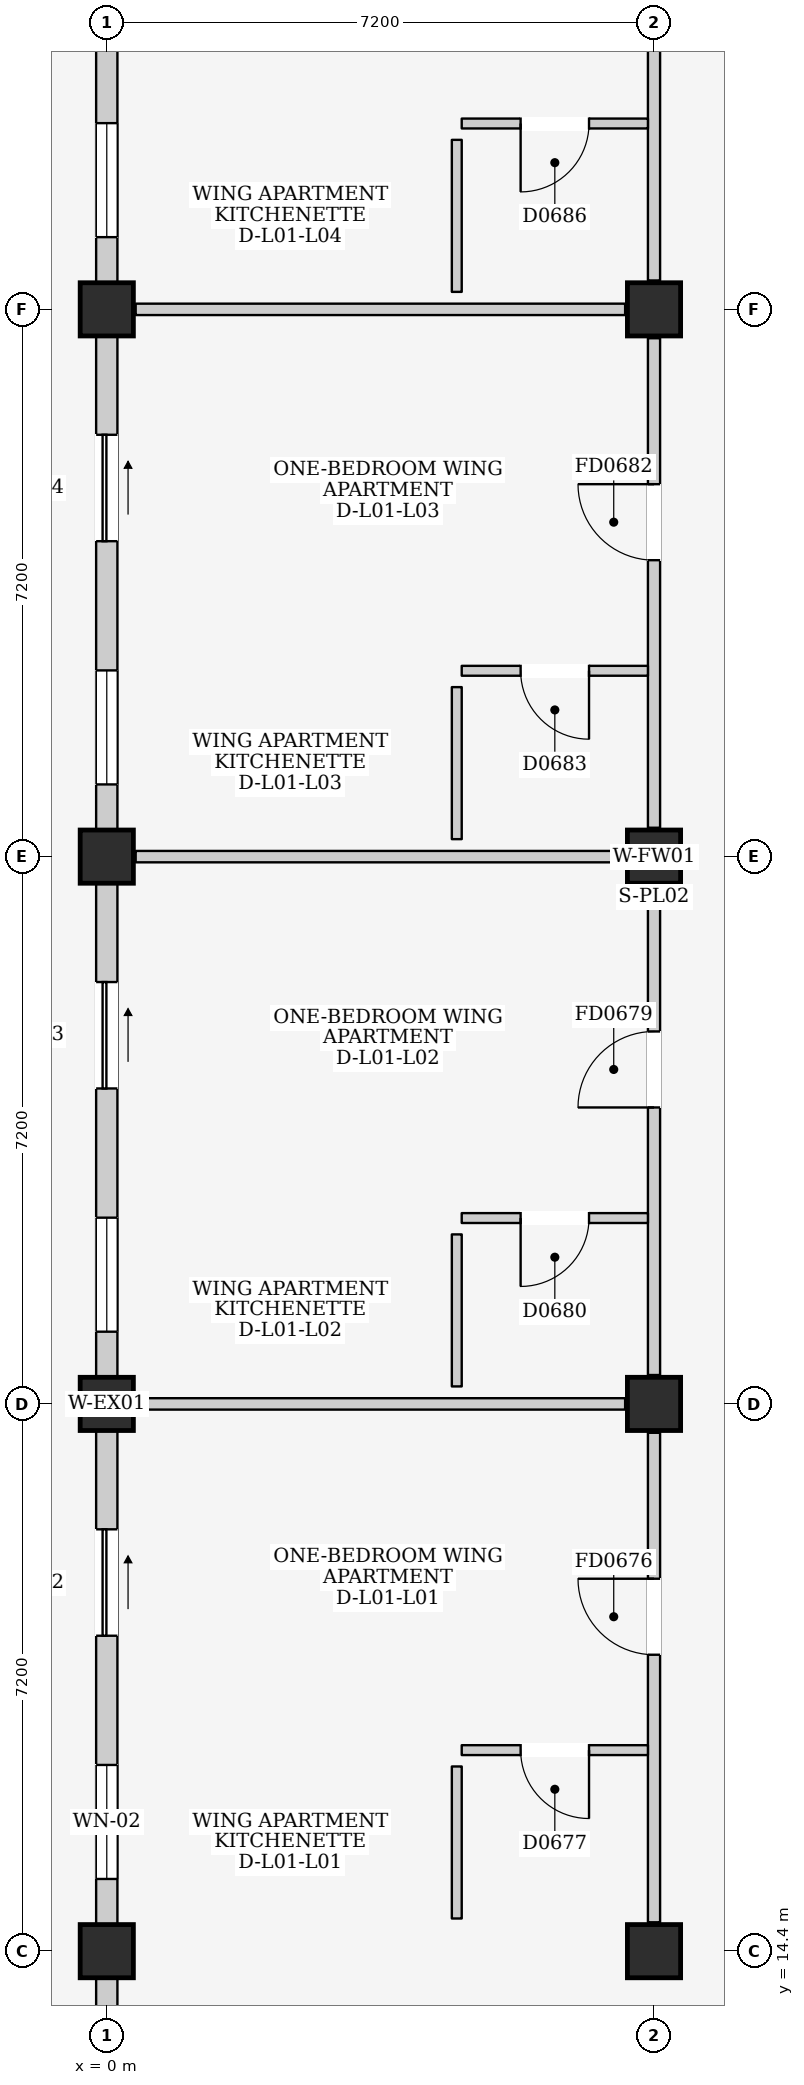
"""IFC4 building model, lengths in metres.
Left out: names, types, materials, properties, quantities, classifications, styles, units other than length and angle.
Written with IfcOpenShell. Run it as: python <this file> out.ifc"""

import sys

from ifc_helpers import new_model, si_unit, direction, frame, frame_2d, origin, origin_2d, place, context, subcontext, project, spatial, rectangle, extrude, element, fill, save


model = new_model("IFC4")
c1 = context("Model", 3, precision=1e-05, world=origin(), true_north=direction((0.0, 1.0)))
c2 = subcontext(c1, "Body", "Model", "MODEL_VIEW")
j1 = project(units=[si_unit("LENGTHUNIT", "METRE"), si_unit("PLANEANGLEUNIT", "RADIAN")], contexts=[c1])
p1 = place(None, origin())
s1 = spatial("IfcSite", under=j1, at=p1, CompositionType="ELEMENT")
p2 = place(p1, origin())
s2 = spatial("IfcBuilding", under=s1, at=p2, CompositionType="ELEMENT")
p3 = place(p2, frame((0.0, 0.0, 4.5)))
s3 = spatial("IfcBuildingStorey", under=s2, at=p3, CompositionType="ELEMENT", Elevation=4.5)
for number, where, z_axis, x_axis in (
    (1, (0.0, 14.4, 0.0), (0.0, 0.0, 1.0), (1.0, 0.0, 0.0)),
    (2, (0.0, 21.6, 0.0), (0.0, 0.0, 1.0), (1.0, 0.0, 0.0)),
    (3, (0.0, 28.8, 0.0), (0.0, 0.0, 1.0), (1.0, 0.0, 0.0)),
    (4, (0.0, 36.0, 0.0), (0.0, 0.0, 1.0), (1.0, 0.0, 0.0)),
    (5, (7.2, 14.4, 0.0), (0.0, 0.0, 1.0), (1.0, 0.0, 0.0)),
    (6, (7.2, 21.6, 0.0), (0.0, 0.0, 1.0), (1.0, 0.0, 0.0)),
    (7, (7.2, 28.8, 0.0), (0.0, 0.0, 1.0), (1.0, 0.0, 0.0)),
    (8, (7.2, 36.0, 0.0), (0.0, 0.0, 1.0), (1.0, 0.0, 0.0)),
):
    element("IfcColumn", number, at=place(p3, frame(where, z_axis=z_axis, x_axis=x_axis)), inside=s3, PredefinedType="COLUMN", context=c2, shape_type="SweptSolid", body=[
        extrude(rectangle(XDim=0.7, YDim=0.7, at=origin_2d()), origin(), (0.0, 0.0, 1.0), 4.5),
    ])
p4 = place(p3, frame((0.0, 7.55, 0.0), z_axis=(0.0, 0.0, 1.0), x_axis=(0.0, 1.0, 0.0)))
e9 = element("IfcWall", 9, at=p4, inside=s3, PredefinedType="ELEMENTEDWALL", context=c2, shape_type="SweptSolid", body=[
    extrude(rectangle(XDim=6.5, YDim=0.28, at=frame_2d((3.25, 0.0))), origin(), (0.0, 0.0, 1.0), 3.715),
])
p5 = place(p4, frame((3.65, 0.0, 0.0)))
e10 = element("IfcOpeningElement", 10, at=p5, cuts=e9, PredefinedType="OPENING", context=c2, shape_type="SweptSolid", body=[
    extrude(rectangle(XDim=1.4, YDim=2.1, at=frame_2d((0.7, 1.05))), frame((0.0, 0.155, 0.0), z_axis=(0.0, -1.0, 0.0), x_axis=(1.0, 0.0, 0.0)), (0.0, 0.0, 1.0), 0.31),
])
p6 = place(p3, frame((0.0, 14.75, 0.0), z_axis=(0.0, 0.0, 1.0), x_axis=(0.0, 1.0, 0.0)))
e11 = element("IfcWall", 11, at=p6, inside=s3, PredefinedType="ELEMENTEDWALL", context=c2, shape_type="SweptSolid", body=[
    extrude(rectangle(XDim=6.5, YDim=0.28, at=frame_2d((3.25, 0.0))), origin(), (0.0, 0.0, 1.0), 3.715),
])
p7 = place(p6, frame((3.8, 0.0, 0.0)))
e12 = element("IfcOpeningElement", 12, at=p7, cuts=e11, PredefinedType="OPENING", context=c2, shape_type="SweptSolid", body=[
    extrude(rectangle(XDim=1.4, YDim=2.1, at=frame_2d((0.7, 1.05))), frame((0.0, 0.155, 0.0), z_axis=(0.0, -1.0, 0.0), x_axis=(1.0, 0.0, 0.0)), (0.0, 0.0, 1.0), 0.31),
])
p8 = place(p6, frame((0.6, 0.0, 0.95)))
e13 = element("IfcOpeningElement", 13, at=p8, cuts=e11, PredefinedType="OPENING", context=c2, shape_type="SweptSolid", body=[
    extrude(rectangle(XDim=1.5, YDim=1.5, at=frame_2d((0.75, 0.75))), frame((0.0, 0.155, 0.0), z_axis=(0.0, -1.0, 0.0), x_axis=(1.0, 0.0, 0.0)), (0.0, 0.0, 1.0), 0.31),
])
p9 = place(p3, frame((0.0, 21.95, 0.0), z_axis=(0.0, 0.0, 1.0), x_axis=(0.0, 1.0, 0.0)))
e14 = element("IfcWall", 14, at=p9, inside=s3, PredefinedType="ELEMENTEDWALL", context=c2, shape_type="SweptSolid", body=[
    extrude(rectangle(XDim=6.5, YDim=0.28, at=frame_2d((3.25, 0.0))), origin(), (0.0, 0.0, 1.0), 3.715),
])
p10 = place(p9, frame((3.8, 0.0, 0.0)))
e15 = element("IfcOpeningElement", 15, at=p10, cuts=e14, PredefinedType="OPENING", context=c2, shape_type="SweptSolid", body=[
    extrude(rectangle(XDim=1.4, YDim=2.1, at=frame_2d((0.7, 1.05))), frame((0.0, 0.155, 0.0), z_axis=(0.0, -1.0, 0.0), x_axis=(1.0, 0.0, 0.0)), (0.0, 0.0, 1.0), 0.31),
])
p11 = place(p9, frame((0.6, 0.0, 0.95)))
e16 = element("IfcOpeningElement", 16, at=p11, cuts=e14, PredefinedType="OPENING", context=c2, shape_type="SweptSolid", body=[
    extrude(rectangle(XDim=1.5, YDim=1.5, at=frame_2d((0.75, 0.75))), frame((0.0, 0.155, 0.0), z_axis=(0.0, -1.0, 0.0), x_axis=(1.0, 0.0, 0.0)), (0.0, 0.0, 1.0), 0.31),
])
p12 = place(p3, frame((0.0, 29.15, 0.0), z_axis=(0.0, 0.0, 1.0), x_axis=(0.0, 1.0, 0.0)))
e17 = element("IfcWall", 17, at=p12, inside=s3, PredefinedType="ELEMENTEDWALL", context=c2, shape_type="SweptSolid", body=[
    extrude(rectangle(XDim=6.5, YDim=0.28, at=frame_2d((3.25, 0.0))), origin(), (0.0, 0.0, 1.0), 3.715),
])
p13 = place(p12, frame((3.8, 0.0, 0.0)))
e18 = element("IfcOpeningElement", 18, at=p13, cuts=e17, PredefinedType="OPENING", context=c2, shape_type="SweptSolid", body=[
    extrude(rectangle(XDim=1.4, YDim=2.1, at=frame_2d((0.7, 1.05))), frame((0.0, 0.155, 0.0), z_axis=(0.0, -1.0, 0.0), x_axis=(1.0, 0.0, 0.0)), (0.0, 0.0, 1.0), 0.31),
])
p14 = place(p12, frame((0.6, 0.0, 0.95)))
e19 = element("IfcOpeningElement", 19, at=p14, cuts=e17, PredefinedType="OPENING", context=c2, shape_type="SweptSolid", body=[
    extrude(rectangle(XDim=1.5, YDim=1.5, at=frame_2d((0.75, 0.75))), frame((0.0, 0.155, 0.0), z_axis=(0.0, -1.0, 0.0), x_axis=(1.0, 0.0, 0.0)), (0.0, 0.0, 1.0), 0.31),
])
p15 = place(p3, frame((0.0, 36.35, 0.0), z_axis=(0.0, 0.0, 1.0), x_axis=(0.0, 1.0, 0.0)))
e20 = element("IfcWall", 20, at=p15, inside=s3, PredefinedType="ELEMENTEDWALL", context=c2, shape_type="SweptSolid", body=[
    extrude(rectangle(XDim=6.5, YDim=0.28, at=frame_2d((3.25, 0.0))), origin(), (0.0, 0.0, 1.0), 3.715),
])
p16 = place(p15, frame((3.8, 0.0, 0.0)))
e21 = element("IfcOpeningElement", 21, at=p16, cuts=e20, PredefinedType="OPENING", context=c2, shape_type="SweptSolid", body=[
    extrude(rectangle(XDim=1.4, YDim=2.1, at=frame_2d((0.7, 1.05))), frame((0.0, 0.155, 0.0), z_axis=(0.0, -1.0, 0.0), x_axis=(1.0, 0.0, 0.0)), (0.0, 0.0, 1.0), 0.31),
])
p17 = place(p15, frame((0.6, 0.0, 0.95)))
e22 = element("IfcOpeningElement", 22, at=p17, cuts=e20, PredefinedType="OPENING", context=c2, shape_type="SweptSolid", body=[
    extrude(rectangle(XDim=1.5, YDim=1.5, at=frame_2d((0.75, 0.75))), frame((0.0, 0.155, 0.0), z_axis=(0.0, -1.0, 0.0), x_axis=(1.0, 0.0, 0.0)), (0.0, 0.0, 1.0), 0.31),
])
p18 = place(p3, frame((7.2, 14.78, 0.0), z_axis=(0.0, 0.0, 1.0), x_axis=(0.0, 1.0, 0.0)))
e23 = element("IfcWall", 23, at=p18, inside=s3, PredefinedType="PARTITIONING", context=c2, shape_type="SweptSolid", body=[
    extrude(rectangle(XDim=6.44, YDim=0.16, at=frame_2d((3.22, 0.0))), origin(), (0.0, 0.0, 1.0), 3.685),
])
p19 = place(p18, frame((3.52, 0.0, 0.0)))
e24 = element("IfcOpeningElement", 24, at=p19, cuts=e23, PredefinedType="OPENING", context=c2, shape_type="SweptSolid", body=[
    extrude(rectangle(XDim=1.0, YDim=2.15, at=frame_2d((0.5, 1.075))), frame((0.0, 0.095, 0.0), z_axis=(0.0, -1.0, 0.0), x_axis=(1.0, 0.0, 0.0)), (0.0, 0.0, 1.0), 0.19),
])
p20 = place(p3, frame((0.38, 21.6, 0.0), z_axis=(0.0, 0.0, 1.0), x_axis=(1.0, 0.0, 0.0)))
e25 = element("IfcWall", 25, at=p20, inside=s3, PredefinedType="PARTITIONING", context=c2, shape_type="SweptSolid", body=[
    extrude(rectangle(XDim=6.44, YDim=0.15, at=frame_2d((3.22, 0.0))), origin(), (0.0, 0.0, 1.0), 3.635),
])
p21 = place(p3, frame((4.67, 17.045, 0.0), z_axis=(0.0, 0.0, 1.0), x_axis=(1.0, 0.0, 0.0)))
e26 = element("IfcWall", 26, at=p21, inside=s3, PredefinedType="PARTITIONING", context=c2, shape_type="SweptSolid", body=[
    extrude(rectangle(XDim=2.45, YDim=0.13, at=frame_2d((1.225, 0.0))), origin(), (0.0, 0.0, 1.0), 4.25),
])
p22 = place(p21, frame((0.775, 0.0, 0.0)))
e27 = element("IfcOpeningElement", 27, at=p22, cuts=e26, PredefinedType="OPENING", context=c2, shape_type="SweptSolid", body=[
    extrude(rectangle(XDim=0.9, YDim=2.1, at=frame_2d((0.45, 1.05))), frame((0.0, 0.08, 0.0), z_axis=(0.0, -1.0, 0.0), x_axis=(1.0, 0.0, 0.0)), (0.0, 0.0, 1.0), 0.16),
])
p23 = place(p3, frame((4.605, 14.83, 0.0), z_axis=(0.0, 0.0, 1.0), x_axis=(0.0, 1.0, 0.0)))
e28 = element("IfcWall", 28, at=p23, inside=s3, PredefinedType="PARTITIONING", context=c2, shape_type="SweptSolid", body=[
    extrude(rectangle(XDim=2.0, YDim=0.13, at=frame_2d((1.0, 0.0))), origin(), (0.0, 0.0, 1.0), 4.25),
])
p24 = place(p3, frame((7.2, 21.98, 0.0), z_axis=(0.0, 0.0, 1.0), x_axis=(0.0, 1.0, 0.0)))
e29 = element("IfcWall", 29, at=p24, inside=s3, PredefinedType="PARTITIONING", context=c2, shape_type="SweptSolid", body=[
    extrude(rectangle(XDim=6.44, YDim=0.16, at=frame_2d((3.22, 0.0))), origin(), (0.0, 0.0, 1.0), 3.685),
])
p25 = place(p24, frame((3.52, 0.0, 0.0)))
e30 = element("IfcOpeningElement", 30, at=p25, cuts=e29, PredefinedType="OPENING", context=c2, shape_type="SweptSolid", body=[
    extrude(rectangle(XDim=1.0, YDim=2.15, at=frame_2d((0.5, 1.075))), frame((0.0, 0.095, 0.0), z_axis=(0.0, -1.0, 0.0), x_axis=(1.0, 0.0, 0.0)), (0.0, 0.0, 1.0), 0.19),
])
p26 = place(p3, frame((0.38, 28.8, 0.0), z_axis=(0.0, 0.0, 1.0), x_axis=(1.0, 0.0, 0.0)))
e31 = element("IfcWall", 31, at=p26, inside=s3, PredefinedType="PARTITIONING", context=c2, shape_type="SweptSolid", body=[
    extrude(rectangle(XDim=6.44, YDim=0.15, at=frame_2d((3.22, 0.0))), origin(), (0.0, 0.0, 1.0), 3.635),
])
p27 = place(p3, frame((4.67, 24.045, 0.0), z_axis=(0.0, 0.0, 1.0), x_axis=(1.0, 0.0, 0.0)))
e32 = element("IfcWall", 32, at=p27, inside=s3, PredefinedType="PARTITIONING", context=c2, shape_type="SweptSolid", body=[
    extrude(rectangle(XDim=2.45, YDim=0.13, at=frame_2d((1.225, 0.0))), origin(), (0.0, 0.0, 1.0), 4.25),
])
p28 = place(p27, frame((0.775, 0.0, 0.0)))
e33 = element("IfcOpeningElement", 33, at=p28, cuts=e32, PredefinedType="OPENING", context=c2, shape_type="SweptSolid", body=[
    extrude(rectangle(XDim=0.9, YDim=2.1, at=frame_2d((0.45, 1.05))), frame((0.0, 0.08, 0.0), z_axis=(0.0, -1.0, 0.0), x_axis=(1.0, 0.0, 0.0)), (0.0, 0.0, 1.0), 0.16),
])
p29 = place(p3, frame((4.605, 21.83, 0.0), z_axis=(0.0, 0.0, 1.0), x_axis=(0.0, 1.0, 0.0)))
e34 = element("IfcWall", 34, at=p29, inside=s3, PredefinedType="PARTITIONING", context=c2, shape_type="SweptSolid", body=[
    extrude(rectangle(XDim=2.0, YDim=0.13, at=frame_2d((1.0, 0.0))), origin(), (0.0, 0.0, 1.0), 4.25),
])
p30 = place(p3, frame((7.2, 29.18, 0.0), z_axis=(0.0, 0.0, 1.0), x_axis=(0.0, 1.0, 0.0)))
e35 = element("IfcWall", 35, at=p30, inside=s3, PredefinedType="PARTITIONING", context=c2, shape_type="SweptSolid", body=[
    extrude(rectangle(XDim=6.44, YDim=0.16, at=frame_2d((3.22, 0.0))), origin(), (0.0, 0.0, 1.0), 3.685),
])
p31 = place(p30, frame((3.52, 0.0, 0.0)))
e36 = element("IfcOpeningElement", 36, at=p31, cuts=e35, PredefinedType="OPENING", context=c2, shape_type="SweptSolid", body=[
    extrude(rectangle(XDim=1.0, YDim=2.15, at=frame_2d((0.5, 1.075))), frame((0.0, 0.095, 0.0), z_axis=(0.0, -1.0, 0.0), x_axis=(1.0, 0.0, 0.0)), (0.0, 0.0, 1.0), 0.19),
])
p32 = place(p3, frame((0.38, 36.0, 0.0), z_axis=(0.0, 0.0, 1.0), x_axis=(1.0, 0.0, 0.0)))
e37 = element("IfcWall", 37, at=p32, inside=s3, PredefinedType="PARTITIONING", context=c2, shape_type="SweptSolid", body=[
    extrude(rectangle(XDim=6.44, YDim=0.15, at=frame_2d((3.22, 0.0))), origin(), (0.0, 0.0, 1.0), 3.635),
])
p33 = place(p3, frame((4.67, 31.245, 0.0), z_axis=(0.0, 0.0, 1.0), x_axis=(1.0, 0.0, 0.0)))
e38 = element("IfcWall", 38, at=p33, inside=s3, PredefinedType="PARTITIONING", context=c2, shape_type="SweptSolid", body=[
    extrude(rectangle(XDim=2.45, YDim=0.13, at=frame_2d((1.225, 0.0))), origin(), (0.0, 0.0, 1.0), 4.25),
])
p34 = place(p33, frame((0.775, 0.0, 0.0)))
e39 = element("IfcOpeningElement", 39, at=p34, cuts=e38, PredefinedType="OPENING", context=c2, shape_type="SweptSolid", body=[
    extrude(rectangle(XDim=0.9, YDim=2.1, at=frame_2d((0.45, 1.05))), frame((0.0, 0.08, 0.0), z_axis=(0.0, -1.0, 0.0), x_axis=(1.0, 0.0, 0.0)), (0.0, 0.0, 1.0), 0.16),
])
p35 = place(p3, frame((4.605, 29.03, 0.0), z_axis=(0.0, 0.0, 1.0), x_axis=(0.0, 1.0, 0.0)))
e40 = element("IfcWall", 40, at=p35, inside=s3, PredefinedType="PARTITIONING", context=c2, shape_type="SweptSolid", body=[
    extrude(rectangle(XDim=2.0, YDim=0.13, at=frame_2d((1.0, 0.0))), origin(), (0.0, 0.0, 1.0), 4.25),
])
p36 = place(p3, frame((7.2, 36.38, 0.0), z_axis=(0.0, 0.0, 1.0), x_axis=(0.0, 1.0, 0.0)))
e41 = element("IfcWall", 41, at=p36, inside=s3, PredefinedType="PARTITIONING", context=c2, shape_type="SweptSolid", body=[
    extrude(rectangle(XDim=6.44, YDim=0.16, at=frame_2d((3.22, 0.0))), origin(), (0.0, 0.0, 1.0), 3.685),
])
p37 = place(p36, frame((3.52, 0.0, 0.0)))
e42 = element("IfcOpeningElement", 42, at=p37, cuts=e41, PredefinedType="OPENING", context=c2, shape_type="SweptSolid", body=[
    extrude(rectangle(XDim=1.0, YDim=2.15, at=frame_2d((0.5, 1.075))), frame((0.0, 0.095, 0.0), z_axis=(0.0, -1.0, 0.0), x_axis=(1.0, 0.0, 0.0)), (0.0, 0.0, 1.0), 0.19),
])
p38 = place(p3, frame((4.67, 38.445, 0.0), z_axis=(0.0, 0.0, 1.0), x_axis=(1.0, 0.0, 0.0)))
e43 = element("IfcWall", 43, at=p38, inside=s3, PredefinedType="PARTITIONING", context=c2, shape_type="SweptSolid", body=[
    extrude(rectangle(XDim=2.45, YDim=0.13, at=frame_2d((1.225, 0.0))), origin(), (0.0, 0.0, 1.0), 4.25),
])
p39 = place(p38, frame((0.775, 0.0, 0.0)))
e44 = element("IfcOpeningElement", 44, at=p39, cuts=e43, PredefinedType="OPENING", context=c2, shape_type="SweptSolid", body=[
    extrude(rectangle(XDim=0.9, YDim=2.1, at=frame_2d((0.45, 1.05))), frame((0.0, 0.08, 0.0), z_axis=(0.0, -1.0, 0.0), x_axis=(1.0, 0.0, 0.0)), (0.0, 0.0, 1.0), 0.16),
])
p40 = place(p3, frame((4.605, 36.23, 0.0), z_axis=(0.0, 0.0, 1.0), x_axis=(0.0, 1.0, 0.0)))
e45 = element("IfcWall", 45, at=p40, inside=s3, PredefinedType="PARTITIONING", context=c2, shape_type="SweptSolid", body=[
    extrude(rectangle(XDim=2.0, YDim=0.13, at=frame_2d((1.0, 0.0))), origin(), (0.0, 0.0, 1.0), 4.25),
])
p41 = place(p7, frame((1.4, 0.0, 0.0), z_axis=(0.0, 0.0, 1.0), x_axis=(-1.0, 0.0, 0.0)))
e46 = element("IfcDoor", 46, at=p41, inside=s3, OperationType="SLIDING_TO_RIGHT", PredefinedType="DOOR", context=c2, shape_type="SweptSolid", body=[
    extrude(rectangle(XDim=1.4, YDim=2.1, at=frame_2d((0.7, 1.05))), frame((0.0, 0.025, 0.0), z_axis=(0.0, -1.0, 0.0), x_axis=(1.0, 0.0, 0.0)), (0.0, 0.0, 1.0), 0.05),
])
fill(e12, e46)
p42 = place(p8, origin())
e47 = element("IfcWindow", 47, at=p42, inside=s3, PartitioningType="DOUBLE_PANEL_VERTICAL", PredefinedType="WINDOW", context=c2, shape_type="SweptSolid", body=[
    extrude(rectangle(XDim=1.5, YDim=1.5, at=frame_2d((0.75, 0.75))), frame((0.0, 0.03, 0.0), z_axis=(0.0, -1.0, 0.0), x_axis=(1.0, 0.0, 0.0)), (0.0, 0.0, 1.0), 0.06),
])
fill(e13, e47)
p43 = place(p10, frame((1.4, 0.0, 0.0), z_axis=(0.0, 0.0, 1.0), x_axis=(-1.0, 0.0, 0.0)))
e48 = element("IfcDoor", 48, at=p43, inside=s3, OperationType="SLIDING_TO_RIGHT", PredefinedType="DOOR", context=c2, shape_type="SweptSolid", body=[
    extrude(rectangle(XDim=1.4, YDim=2.1, at=frame_2d((0.7, 1.05))), frame((0.0, 0.025, 0.0), z_axis=(0.0, -1.0, 0.0), x_axis=(1.0, 0.0, 0.0)), (0.0, 0.0, 1.0), 0.05),
])
fill(e15, e48)
p44 = place(p11, origin())
e49 = element("IfcWindow", 49, at=p44, inside=s3, PartitioningType="DOUBLE_PANEL_VERTICAL", PredefinedType="WINDOW", context=c2, shape_type="SweptSolid", body=[
    extrude(rectangle(XDim=1.5, YDim=1.5, at=frame_2d((0.75, 0.75))), frame((0.0, 0.03, 0.0), z_axis=(0.0, -1.0, 0.0), x_axis=(1.0, 0.0, 0.0)), (0.0, 0.0, 1.0), 0.06),
])
fill(e16, e49)
p45 = place(p13, frame((1.4, 0.0, 0.0), z_axis=(0.0, 0.0, 1.0), x_axis=(-1.0, 0.0, 0.0)))
e50 = element("IfcDoor", 50, at=p45, inside=s3, OperationType="SLIDING_TO_RIGHT", PredefinedType="DOOR", context=c2, shape_type="SweptSolid", body=[
    extrude(rectangle(XDim=1.4, YDim=2.1, at=frame_2d((0.7, 1.05))), frame((0.0, 0.025, 0.0), z_axis=(0.0, -1.0, 0.0), x_axis=(1.0, 0.0, 0.0)), (0.0, 0.0, 1.0), 0.05),
])
fill(e18, e50)
p46 = place(p14, origin())
e51 = element("IfcWindow", 51, at=p46, inside=s3, PartitioningType="DOUBLE_PANEL_VERTICAL", PredefinedType="WINDOW", context=c2, shape_type="SweptSolid", body=[
    extrude(rectangle(XDim=1.5, YDim=1.5, at=frame_2d((0.75, 0.75))), frame((0.0, 0.03, 0.0), z_axis=(0.0, -1.0, 0.0), x_axis=(1.0, 0.0, 0.0)), (0.0, 0.0, 1.0), 0.06),
])
fill(e19, e51)
p47 = place(p17, origin())
e52 = element("IfcWindow", 52, at=p47, inside=s3, PartitioningType="DOUBLE_PANEL_VERTICAL", PredefinedType="WINDOW", context=c2, shape_type="SweptSolid", body=[
    extrude(rectangle(XDim=1.5, YDim=1.5, at=frame_2d((0.75, 0.75))), frame((0.0, 0.03, 0.0), z_axis=(0.0, -1.0, 0.0), x_axis=(1.0, 0.0, 0.0)), (0.0, 0.0, 1.0), 0.06),
])
fill(e22, e52)
p48 = place(p19, origin())
e53 = element("IfcDoor", 53, at=p48, inside=s3, OperationType="SINGLE_SWING_RIGHT", PredefinedType="DOOR", context=c2, shape_type="SweptSolid", body=[
    extrude(rectangle(XDim=1.0, YDim=2.15, at=frame_2d((0.5, 1.075))), frame((0.0, 0.025, 0.0), z_axis=(0.0, -1.0, 0.0), x_axis=(1.0, 0.0, 0.0)), (0.0, 0.0, 1.0), 0.05),
])
fill(e24, e53)
p49 = place(p22, frame((0.9, 0.0, 0.0), z_axis=(0.0, 0.0, 1.0), x_axis=(-1.0, 0.0, 0.0)))
e54 = element("IfcDoor", 54, at=p49, inside=s3, OperationType="SINGLE_SWING_LEFT", PredefinedType="DOOR", context=c2, shape_type="SweptSolid", body=[
    extrude(rectangle(XDim=0.9, YDim=2.1, at=frame_2d((0.45, 1.05))), frame((0.0, 0.025, 0.0), z_axis=(0.0, -1.0, 0.0), x_axis=(1.0, 0.0, 0.0)), (0.0, 0.0, 1.0), 0.05),
])
fill(e27, e54)
p50 = place(p25, origin())
e55 = element("IfcDoor", 55, at=p50, inside=s3, OperationType="SINGLE_SWING_LEFT", PredefinedType="DOOR", context=c2, shape_type="SweptSolid", body=[
    extrude(rectangle(XDim=1.0, YDim=2.15, at=frame_2d((0.5, 1.075))), frame((0.0, 0.025, 0.0), z_axis=(0.0, -1.0, 0.0), x_axis=(1.0, 0.0, 0.0)), (0.0, 0.0, 1.0), 0.05),
])
fill(e30, e55)
p51 = place(p28, frame((0.9, 0.0, 0.0), z_axis=(0.0, 0.0, 1.0), x_axis=(-1.0, 0.0, 0.0)))
e56 = element("IfcDoor", 56, at=p51, inside=s3, OperationType="SINGLE_SWING_RIGHT", PredefinedType="DOOR", context=c2, shape_type="SweptSolid", body=[
    extrude(rectangle(XDim=0.9, YDim=2.1, at=frame_2d((0.45, 1.05))), frame((0.0, 0.025, 0.0), z_axis=(0.0, -1.0, 0.0), x_axis=(1.0, 0.0, 0.0)), (0.0, 0.0, 1.0), 0.05),
])
fill(e33, e56)
p52 = place(p31, origin())
e57 = element("IfcDoor", 57, at=p52, inside=s3, OperationType="SINGLE_SWING_RIGHT", PredefinedType="DOOR", context=c2, shape_type="SweptSolid", body=[
    extrude(rectangle(XDim=1.0, YDim=2.15, at=frame_2d((0.5, 1.075))), frame((0.0, 0.025, 0.0), z_axis=(0.0, -1.0, 0.0), x_axis=(1.0, 0.0, 0.0)), (0.0, 0.0, 1.0), 0.05),
])
fill(e36, e57)
p53 = place(p34, frame((0.9, 0.0, 0.0), z_axis=(0.0, 0.0, 1.0), x_axis=(-1.0, 0.0, 0.0)))
e58 = element("IfcDoor", 58, at=p53, inside=s3, OperationType="SINGLE_SWING_LEFT", PredefinedType="DOOR", context=c2, shape_type="SweptSolid", body=[
    extrude(rectangle(XDim=0.9, YDim=2.1, at=frame_2d((0.45, 1.05))), frame((0.0, 0.025, 0.0), z_axis=(0.0, -1.0, 0.0), x_axis=(1.0, 0.0, 0.0)), (0.0, 0.0, 1.0), 0.05),
])
fill(e39, e58)
p54 = place(p39, frame((0.9, 0.0, 0.0), z_axis=(0.0, 0.0, 1.0), x_axis=(-1.0, 0.0, 0.0)))
e59 = element("IfcDoor", 59, at=p54, inside=s3, OperationType="SINGLE_SWING_RIGHT", PredefinedType="DOOR", context=c2, shape_type="SweptSolid", body=[
    extrude(rectangle(XDim=0.9, YDim=2.1, at=frame_2d((0.45, 1.05))), frame((0.0, 0.025, 0.0), z_axis=(0.0, -1.0, 0.0), x_axis=(1.0, 0.0, 0.0)), (0.0, 0.0, 1.0), 0.05),
])
fill(e44, e59)
save(model, sys.argv[1])
